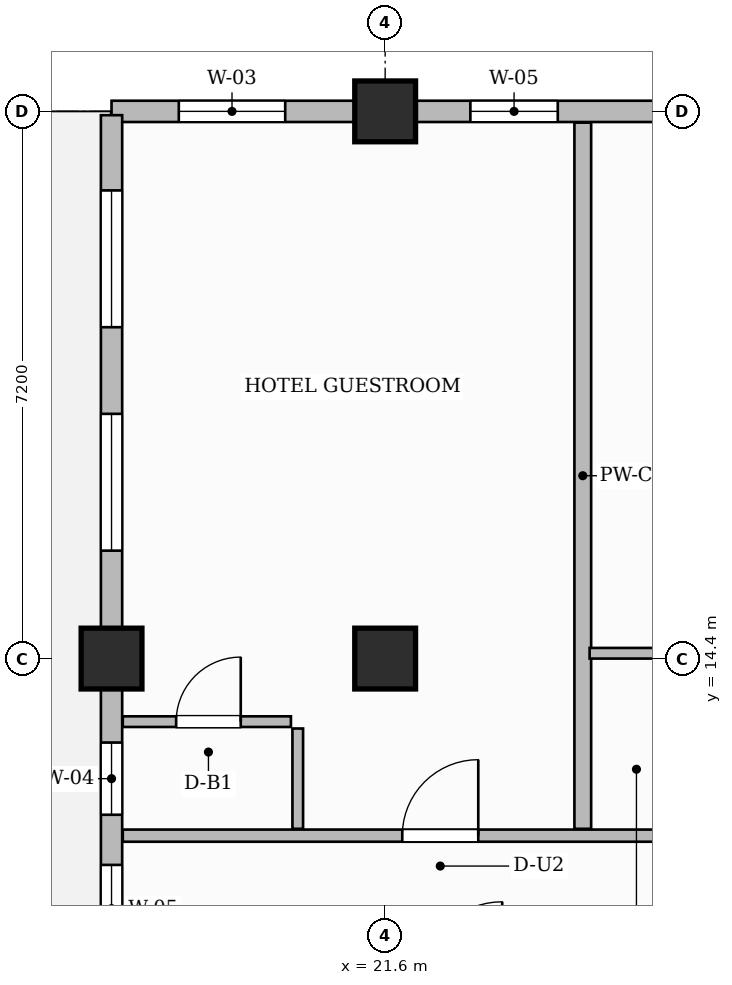
"""IFC4 building model, lengths in metres.
Left out: names, types, materials, properties, quantities, classifications, styles, units other than length and angle.
Written with IfcOpenShell. Run it as: python <this file> out.ifc"""

import sys

from ifc_helpers import new_model, si_unit, direction, frame, frame_2d, origin, origin_2d, place, context, subcontext, project, spatial, rectangle, extrude, source, transform, mapped, element, fill, save


model = new_model("IFC4")
c1 = context("Model", 3, precision=1e-05, world=origin(), true_north=direction((0.0, 1.0)))
c2 = subcontext(c1, "Body", "Model", "MODEL_VIEW")
j1 = project(units=[si_unit("LENGTHUNIT", "METRE"), si_unit("PLANEANGLEUNIT", "RADIAN")], contexts=[c1])
p1 = place(None, origin())
s1 = spatial("IfcSite", under=j1, at=p1, CompositionType="ELEMENT")
p2 = place(p1, origin())
s2 = spatial("IfcBuilding", under=s1, at=p2, CompositionType="ELEMENT")
p3 = place(p2, frame((0.0, 0.0, 251.95)))
s3 = spatial("IfcBuildingStorey", under=s2, at=p3, CompositionType="ELEMENT", Elevation=251.95)
m1 = source(origin(), c2, "Body", "SweptSolid", [
    extrude(rectangle(XDim=0.8, YDim=0.8, at=origin_2d()), origin(), (0.0, 0.0, 1.0), 3.85),
])
for number, where, z_axis, x_axis in (
    (1, (21.6, 14.4, 0.0), (0.0, 0.0, 1.0), (1.0, 0.0, 0.0)),
    (2, (21.6, 21.6, 0.0), (0.0, 0.0, 1.0), (1.0, 0.0, 0.0)),
    (3, (18.0, 14.4, 0.0), (0.0, 0.0, 1.0), (1.0, 0.0, 0.0)),
):
    element("IfcColumn", number, at=place(p3, frame(where, z_axis=z_axis, x_axis=x_axis)), inside=s3, PredefinedType="COLUMN", context=c2, shape_type="MappedRepresentation", body=[
        mapped(m1, transform((0.0, 0.0, 0.0), scale=1.0)),
    ])
p4 = place(p3, frame((18.148, 12.07, 0.0), z_axis=(0.0, 0.0, 1.0), x_axis=(1.0, 0.0, 0.0)))
e4 = element("IfcWall", 4, at=p4, inside=s3, PredefinedType="PARTITIONING", context=c2, shape_type="SweptSolid", body=[
    extrude(rectangle(XDim=11.962, YDim=0.16, at=frame_2d((5.981, 0.0))), origin(), (0.0, 0.0, 1.0), 3.6),
])
p5 = place(p4, frame((3.677, 0.0, 0.0)))
e5 = element("IfcOpeningElement", 5, at=p5, cuts=e4, PredefinedType="OPENING", context=c2, shape_type="SweptSolid", body=[
    extrude(rectangle(XDim=1.0, YDim=2.2, at=frame_2d((0.5, 1.1))), frame((0.0, 0.09, 0.0), z_axis=(0.0, -1.0, 0.0), x_axis=(1.0, 0.0, 0.0)), (0.0, 0.0, 1.0), 0.18),
])
p6 = place(p4, frame((9.677, 0.0, 0.0)))
e6 = element("IfcOpeningElement", 6, at=p6, cuts=e4, PredefinedType="OPENING", context=c2, shape_type="SweptSolid", body=[
    extrude(rectangle(XDim=1.05, YDim=2.25, at=frame_2d((0.525, 1.125))), frame((0.0, 0.09, 0.0), z_axis=(0.0, -1.0, 0.0), x_axis=(1.0, 0.0, 0.0)), (0.0, 0.0, 1.0), 0.18),
])
p7 = place(p3, frame((24.2, 12.16, 0.0), z_axis=(0.0, 0.0, 1.0), x_axis=(0.0, 1.0, 0.0)))
e7 = element("IfcWall", 7, at=p7, inside=s3, PredefinedType="PARTITIONING", context=c2, shape_type="SweptSolid", body=[
    extrude(rectangle(XDim=9.292, YDim=0.22, at=frame_2d((4.646, 0.0))), origin(), (0.0, 0.0, 1.0), 3.6),
])
p8 = place(p3, frame((20.45, 12.16, 0.0), z_axis=(0.0, 0.0, 1.0), x_axis=(0.0, 1.0, 0.0)))
e8 = element("IfcWall", 8, at=p8, inside=s3, PredefinedType="PARTITIONING", context=c2, shape_type="SweptSolid", body=[
    extrude(rectangle(XDim=1.32, YDim=0.14, at=frame_2d((0.66, 0.0))), origin(), (0.0, 0.0, 1.0), 3.6),
])
p9 = place(p3, frame((18.148, 13.57, 0.0), z_axis=(0.0, 0.0, 1.0), x_axis=(1.0, 0.0, 0.0)))
e9 = element("IfcWall", 9, at=p9, inside=s3, PredefinedType="PARTITIONING", context=c2, shape_type="SweptSolid", body=[
    extrude(rectangle(XDim=2.212, YDim=0.14, at=frame_2d((1.106, 0.0))), origin(), (0.0, 0.0, 1.0), 3.6),
])
p10 = place(p9, frame((0.702, 0.0, 0.0)))
e10 = element("IfcOpeningElement", 10, at=p10, cuts=e9, PredefinedType="OPENING", context=c2, shape_type="SweptSolid", body=[
    extrude(rectangle(XDim=0.85, YDim=2.1, at=frame_2d((0.425, 1.05))), frame((0.0, 0.08, 0.0), z_axis=(0.0, -1.0, 0.0), x_axis=(1.0, 0.0, 0.0)), (0.0, 0.0, 1.0), 0.16),
])
p11 = place(p3, frame((24.29, 14.47, 0.0), z_axis=(0.0, 0.0, 1.0), x_axis=(1.0, 0.0, 0.0)))
e11 = element("IfcWall", 11, at=p11, inside=s3, PredefinedType="PARTITIONING", context=c2, shape_type="SweptSolid", body=[
    extrude(rectangle(XDim=2.12, YDim=0.14, at=frame_2d((1.06, 0.0))), origin(), (0.0, 0.0, 1.0), 3.135),
])
p12 = place(p3, frame((18.0, 21.6, 0.0), z_axis=(0.0, 0.0, 1.0), x_axis=(1.0, 0.0, 0.0)))
e12 = element("IfcWall", 12, at=p12, inside=s3, PredefinedType="SOLIDWALL", context=c2, shape_type="SweptSolid", body=[
    extrude(rectangle(XDim=31.8, YDim=0.28, at=frame_2d((15.9, 0.0))), origin(), (0.0, 0.0, 1.0), 3.135),
])
p13 = place(p12, frame((0.885, 0.0, 0.8)))
e13 = element("IfcOpeningElement", 13, at=p13, cuts=e12, PredefinedType="OPENING", context=c2, shape_type="SweptSolid", body=[
    extrude(rectangle(XDim=1.4, YDim=1.85, at=frame_2d((0.7, 0.925))), frame((0.0, 0.15, 0.0), z_axis=(0.0, -1.0, 0.0), x_axis=(1.0, 0.0, 0.0)), (0.0, 0.0, 1.0), 0.3),
])
p14 = place(p12, frame((4.721, 0.0, 0.8)))
e14 = element("IfcOpeningElement", 14, at=p14, cuts=e12, PredefinedType="OPENING", context=c2, shape_type="SweptSolid", body=[
    extrude(rectangle(XDim=1.15, YDim=1.8, at=frame_2d((0.575, 0.9))), frame((0.0, 0.15, 0.0), z_axis=(0.0, -1.0, 0.0), x_axis=(1.0, 0.0, 0.0)), (0.0, 0.0, 1.0), 0.3),
])
p15 = place(p12, frame((7.204, 0.0, 0.8)))
e15 = element("IfcOpeningElement", 15, at=p15, cuts=e12, PredefinedType="OPENING", context=c2, shape_type="SweptSolid", body=[
    extrude(rectangle(XDim=1.8, YDim=1.85, at=frame_2d((0.9, 0.925))), frame((0.0, 0.15, 0.0), z_axis=(0.0, -1.0, 0.0), x_axis=(1.0, 0.0, 0.0)), (0.0, 0.0, 1.0), 0.3),
])
p16 = place(p12, frame((13.001, 0.0, 0.8)))
e16 = element("IfcOpeningElement", 16, at=p16, cuts=e12, PredefinedType="OPENING", context=c2, shape_type="SweptSolid", body=[
    extrude(rectangle(XDim=1.8, YDim=1.85, at=frame_2d((0.9, 0.925))), frame((0.0, 0.15, 0.0), z_axis=(0.0, -1.0, 0.0), x_axis=(1.0, 0.0, 0.0)), (0.0, 0.0, 1.0), 0.3),
])
p17 = place(p12, frame((18.123, 0.0, 0.8)))
e17 = element("IfcOpeningElement", 17, at=p17, cuts=e12, PredefinedType="OPENING", context=c2, shape_type="SweptSolid", body=[
    extrude(rectangle(XDim=1.8, YDim=1.85, at=frame_2d((0.9, 0.925))), frame((0.0, 0.15, 0.0), z_axis=(0.0, -1.0, 0.0), x_axis=(1.0, 0.0, 0.0)), (0.0, 0.0, 1.0), 0.3),
])
p18 = place(p12, frame((20.869, 0.0, 0.8)))
e18 = element("IfcOpeningElement", 18, at=p18, cuts=e12, PredefinedType="OPENING", context=c2, shape_type="SweptSolid", body=[
    extrude(rectangle(XDim=1.8, YDim=1.85, at=frame_2d((0.9, 0.925))), frame((0.0, 0.15, 0.0), z_axis=(0.0, -1.0, 0.0), x_axis=(1.0, 0.0, 0.0)), (0.0, 0.0, 1.0), 0.3),
])
p19 = place(p12, frame((25.475, 0.0, 0.8)))
e19 = element("IfcOpeningElement", 19, at=p19, cuts=e12, PredefinedType="OPENING", context=c2, shape_type="SweptSolid", body=[
    extrude(rectangle(XDim=1.8, YDim=1.85, at=frame_2d((0.9, 0.925))), frame((0.0, 0.15, 0.0), z_axis=(0.0, -1.0, 0.0), x_axis=(1.0, 0.0, 0.0)), (0.0, 0.0, 1.0), 0.3),
])
p20 = place(p12, frame((28.525, 0.0, 0.8)))
e20 = element("IfcOpeningElement", 20, at=p20, cuts=e12, PredefinedType="OPENING", context=c2, shape_type="SweptSolid", body=[
    extrude(rectangle(XDim=1.8, YDim=1.85, at=frame_2d((0.9, 0.925))), frame((0.0, 0.15, 0.0), z_axis=(0.0, -1.0, 0.0), x_axis=(1.0, 0.0, 0.0)), (0.0, 0.0, 1.0), 0.3),
])
p21 = place(p3, frame((18.0, 0.05, 0.0), z_axis=(0.0, 0.0, 1.0), x_axis=(0.0, 1.0, 0.0)))
e21 = element("IfcWall", 21, at=p21, inside=s3, PredefinedType="SOLIDWALL", context=c2, shape_type="SweptSolid", body=[
    extrude(rectangle(XDim=21.5, YDim=0.28, at=frame_2d((10.75, 0.0))), origin(), (0.0, 0.0, 1.0), 3.6),
])
p22 = place(p21, frame((1.831, 0.0, 0.8)))
e22 = element("IfcOpeningElement", 22, at=p22, cuts=e21, PredefinedType="OPENING", context=c2, shape_type="SweptSolid", body=[
    extrude(rectangle(XDim=1.8, YDim=1.85, at=frame_2d((0.9, 0.925))), frame((0.0, 0.15, 0.0), z_axis=(0.0, -1.0, 0.0), x_axis=(1.0, 0.0, 0.0)), (0.0, 0.0, 1.0), 0.3),
])
p23 = place(p21, frame((8.321, 0.0, 0.8)))
e23 = element("IfcOpeningElement", 23, at=p23, cuts=e21, PredefinedType="OPENING", context=c2, shape_type="SweptSolid", body=[
    extrude(rectangle(XDim=1.4, YDim=1.85, at=frame_2d((0.7, 0.925))), frame((0.0, 0.15, 0.0), z_axis=(0.0, -1.0, 0.0), x_axis=(1.0, 0.0, 0.0)), (0.0, 0.0, 1.0), 0.3),
])
p24 = place(p21, frame((10.485, 0.0, 0.8)))
e24 = element("IfcOpeningElement", 24, at=p24, cuts=e21, PredefinedType="OPENING", context=c2, shape_type="SweptSolid", body=[
    extrude(rectangle(XDim=1.15, YDim=1.8, at=frame_2d((0.575, 0.9))), frame((0.0, 0.15, 0.0), z_axis=(0.0, -1.0, 0.0), x_axis=(1.0, 0.0, 0.0)), (0.0, 0.0, 1.0), 0.3),
])
p25 = place(p21, frame((12.295, 0.0, 0.8)))
e25 = element("IfcOpeningElement", 25, at=p25, cuts=e21, PredefinedType="OPENING", context=c2, shape_type="SweptSolid", body=[
    extrude(rectangle(XDim=0.95, YDim=1.75, at=frame_2d((0.475, 0.875))), frame((0.0, 0.15, 0.0), z_axis=(0.0, -1.0, 0.0), x_axis=(1.0, 0.0, 0.0)), (0.0, 0.0, 1.0), 0.3),
])
p26 = place(p21, frame((15.77, 0.0, 0.8)))
e26 = element("IfcOpeningElement", 26, at=p26, cuts=e21, PredefinedType="OPENING", context=c2, shape_type="SweptSolid", body=[
    extrude(rectangle(XDim=1.8, YDim=1.85, at=frame_2d((0.9, 0.925))), frame((0.0, 0.15, 0.0), z_axis=(0.0, -1.0, 0.0), x_axis=(1.0, 0.0, 0.0)), (0.0, 0.0, 1.0), 0.3),
])
p27 = place(p21, frame((18.71, 0.0, 0.8)))
e27 = element("IfcOpeningElement", 27, at=p27, cuts=e21, PredefinedType="OPENING", context=c2, shape_type="SweptSolid", body=[
    extrude(rectangle(XDim=1.8, YDim=1.85, at=frame_2d((0.9, 0.925))), frame((0.0, 0.15, 0.0), z_axis=(0.0, -1.0, 0.0), x_axis=(1.0, 0.0, 0.0)), (0.0, 0.0, 1.0), 0.3),
])
m2 = source(origin(), c2, "Body", "SweptSolid", [
    extrude(rectangle(XDim=0.85, YDim=2.1, at=frame_2d((0.425, 1.05))), frame((0.0, 0.025, 0.0), z_axis=(0.0, -1.0, 0.0), x_axis=(1.0, 0.0, 0.0)), (0.0, 0.0, 1.0), 0.05),
])
p28 = place(p10, origin())
e28 = element("IfcDoor", 28, at=p28, inside=s3, OperationType="SINGLE_SWING_RIGHT", PredefinedType="DOOR", context=c2, shape_type="MappedRepresentation", body=[
    mapped(m2, transform((0.0, 0.0, 0.0), scale=1.0)),
])
fill(e10, e28)
m3 = source(origin(), c2, "Body", "SweptSolid", [
    extrude(rectangle(XDim=1.0, YDim=2.2, at=frame_2d((0.5, 1.1))), frame((0.0, 0.025, 0.0), z_axis=(0.0, -1.0, 0.0), x_axis=(1.0, 0.0, 0.0)), (0.0, 0.0, 1.0), 0.05),
])
p29 = place(p5, origin())
e29 = element("IfcDoor", 29, at=p29, inside=s3, OperationType="SINGLE_SWING_RIGHT", PredefinedType="DOOR", context=c2, shape_type="MappedRepresentation", body=[
    mapped(m3, transform((0.0, 0.0, 0.0), scale=1.0)),
])
fill(e5, e29)
m4 = source(origin(), c2, "Body", "SweptSolid", [
    extrude(rectangle(XDim=1.4, YDim=1.85, at=frame_2d((0.7, 0.925))), frame((0.0, 0.03, 0.0), z_axis=(0.0, -1.0, 0.0), x_axis=(1.0, 0.0, 0.0)), (0.0, 0.0, 1.0), 0.06),
])
p30 = place(p13, origin())
e30 = element("IfcWindow", 30, at=p30, inside=s3, PartitioningType="SINGLE_PANEL", PredefinedType="WINDOW", context=c2, shape_type="MappedRepresentation", body=[
    mapped(m4, transform((0.0, 0.0, 0.0), scale=1.0)),
])
fill(e13, e30)
m5 = source(origin(), c2, "Body", "SweptSolid", [
    extrude(rectangle(XDim=1.15, YDim=1.8, at=frame_2d((0.575, 0.9))), frame((0.0, 0.03, 0.0), z_axis=(0.0, -1.0, 0.0), x_axis=(1.0, 0.0, 0.0)), (0.0, 0.0, 1.0), 0.06),
])
p31 = place(p14, origin())
e31 = element("IfcWindow", 31, at=p31, inside=s3, PartitioningType="SINGLE_PANEL", PredefinedType="WINDOW", context=c2, shape_type="MappedRepresentation", body=[
    mapped(m5, transform((0.0, 0.0, 0.0), scale=1.0)),
])
fill(e14, e31)
p32 = place(p24, origin())
e32 = element("IfcWindow", 32, at=p32, inside=s3, PartitioningType="SINGLE_PANEL", PredefinedType="WINDOW", context=c2, shape_type="MappedRepresentation", body=[
    mapped(m5, transform((0.0, 0.0, 0.0), scale=1.0)),
])
fill(e24, e32)
m6 = source(origin(), c2, "Body", "SweptSolid", [
    extrude(rectangle(XDim=0.95, YDim=1.75, at=frame_2d((0.475, 0.875))), frame((0.0, 0.03, 0.0), z_axis=(0.0, -1.0, 0.0), x_axis=(1.0, 0.0, 0.0)), (0.0, 0.0, 1.0), 0.06),
])
p33 = place(p25, origin())
e33 = element("IfcWindow", 33, at=p33, inside=s3, PartitioningType="SINGLE_PANEL", PredefinedType="WINDOW", context=c2, shape_type="MappedRepresentation", body=[
    mapped(m6, transform((0.0, 0.0, 0.0), scale=1.0)),
])
fill(e25, e33)
m7 = source(origin(), c2, "Body", "SweptSolid", [
    extrude(rectangle(XDim=1.8, YDim=1.85, at=frame_2d((0.9, 0.925))), frame((0.0, 0.03, 0.0), z_axis=(0.0, -1.0, 0.0), x_axis=(1.0, 0.0, 0.0)), (0.0, 0.0, 1.0), 0.06),
])
p34 = place(p26, origin())
e34 = element("IfcWindow", 34, at=p34, inside=s3, PartitioningType="DOUBLE_PANEL_VERTICAL", PredefinedType="WINDOW", context=c2, shape_type="MappedRepresentation", body=[
    mapped(m7, transform((0.0, 0.0, 0.0), scale=1.0)),
])
fill(e26, e34)
p35 = place(p27, origin())
e35 = element("IfcWindow", 35, at=p35, inside=s3, PartitioningType="DOUBLE_PANEL_VERTICAL", PredefinedType="WINDOW", context=c2, shape_type="MappedRepresentation", body=[
    mapped(m7, transform((0.0, 0.0, 0.0), scale=1.0)),
])
fill(e27, e35)
save(model, sys.argv[1])
